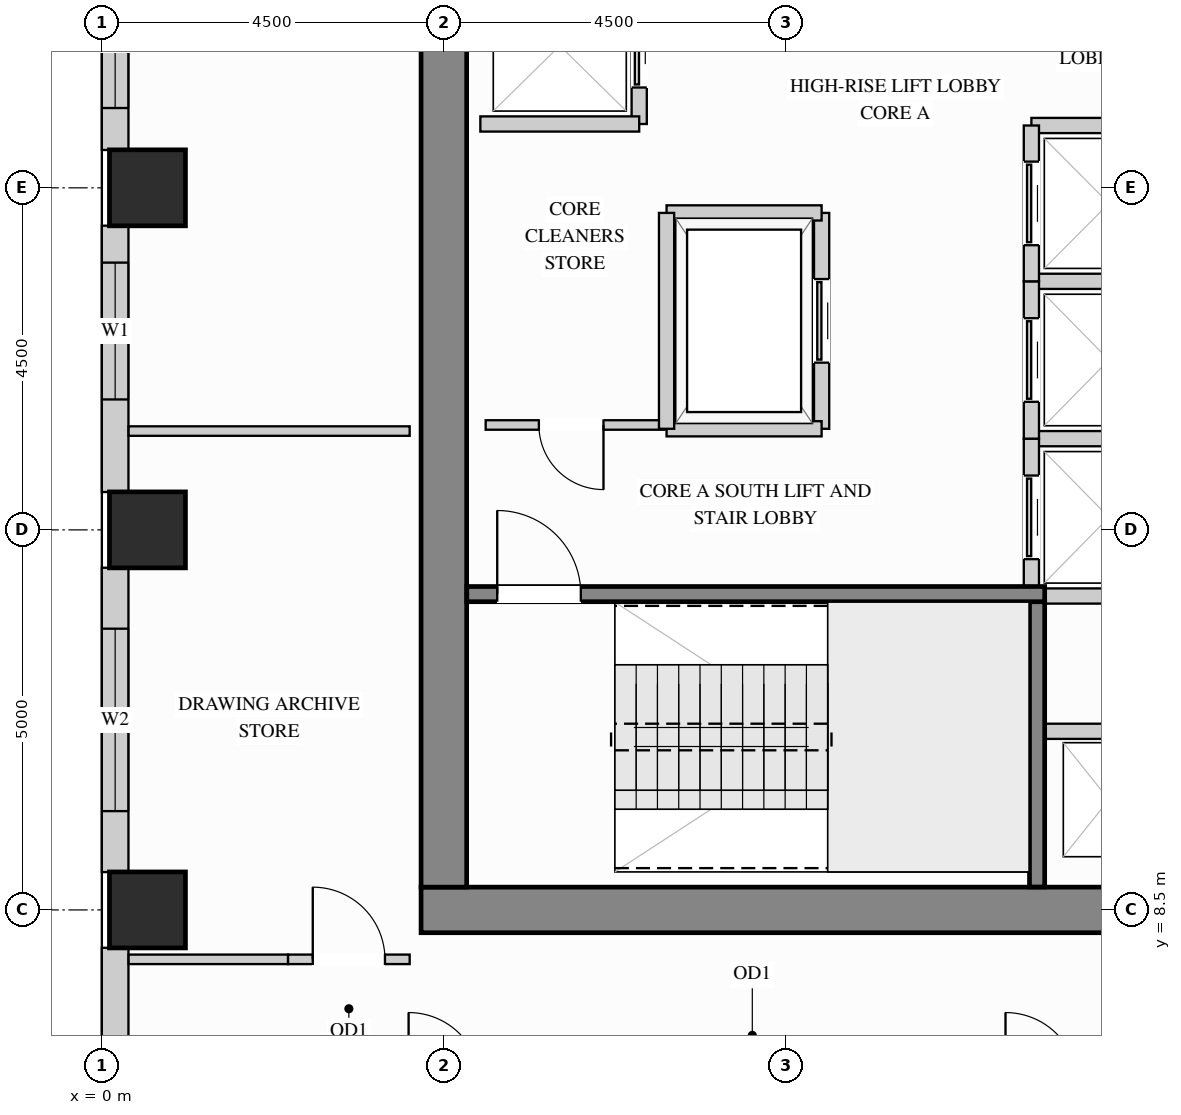
"""IFC4 building model, lengths in metres.
Left out: names, types, materials, properties, quantities, classifications, styles, units other than length and angle.
Written with IfcOpenShell. Run it as: python <this file> out.ifc"""

import sys

from ifc_helpers import new_model, si_unit, direction, frame, frame_2d, origin, origin_2d, place, context, subcontext, project, spatial, rectangle, extrude, source, transform, mapped, element, fill, save


model = new_model("IFC4")
c1 = context("Model", 3, precision=1e-05, world=origin(), true_north=direction((0.0, 1.0)))
c2 = subcontext(c1, "Body", "Model", "MODEL_VIEW")
j1 = project(units=[si_unit("LENGTHUNIT", "METRE"), si_unit("PLANEANGLEUNIT", "RADIAN")], contexts=[c1])
p1 = place(None, origin())
s1 = spatial("IfcSite", under=j1, at=p1, CompositionType="ELEMENT")
p2 = place(p1, origin())
s2 = spatial("IfcBuilding", under=s1, at=p2, CompositionType="ELEMENT")
p3 = place(p2, frame((0.0, 0.0, 200.7)))
s3 = spatial("IfcBuildingStorey", under=s2, at=p3, CompositionType="ELEMENT", Elevation=200.7)
m1 = source(origin(), c2, "Body", "SweptSolid", [
    extrude(rectangle(XDim=1.0, YDim=1.0, at=origin_2d()), origin(), (0.0, 0.0, 1.0), 3.4),
])
for number, where, z_axis, x_axis in (
    (1, (0.6, 13.5, 0.0), (0.0, 0.0, 1.0), (1.0, 0.0, 0.0)),
    (2, (0.6, 18.0, 0.0), (0.0, 0.0, 1.0), (1.0, 0.0, 0.0)),
    (3, (0.6, 8.5, 0.0), (0.0, 0.0, 1.0), (1.0, 0.0, 0.0)),
):
    element("IfcColumn", number, at=place(p3, frame(where, z_axis=z_axis, x_axis=x_axis)), inside=s3, PredefinedType="COLUMN", context=c2, shape_type="MappedRepresentation", body=[
        mapped(m1, transform((0.0, 0.0, 0.0), x_axis=(1.0, 0.0, 0.0), y_axis=(0.0, 1.0, 0.0), z_axis=(0.0, 0.0, 1.0))),
    ])
m2 = source(origin(), c2, "Body", "SweptSolid", [
    extrude(rectangle(XDim=10.6, YDim=0.6, at=frame_2d((5.3, 0.0))), origin(), (0.0, 0.0, 1.0), 3.4),
])
p4 = place(p3, frame((4.2, 8.5, 0.0), z_axis=(0.0, 0.0, 1.0), x_axis=(1.0, 0.0, 0.0)))
e4 = element("IfcWall", 4, at=p4, inside=s3, PredefinedType="SHEAR", context=c2, shape_type="MappedRepresentation", body=[
    mapped(m2, transform((0.0, 0.0, 0.0), x_axis=(1.0, 0.0, 0.0), y_axis=(0.0, 1.0, 0.0), z_axis=(0.0, 0.0, 1.0))),
])
m3 = source(origin(), c2, "Body", "SweptSolid", [
    extrude(rectangle(XDim=20.4, YDim=0.6, at=frame_2d((10.2, 0.0))), origin(), (0.0, 0.0, 1.0), 3.4),
])
p5 = place(p3, frame((4.5, 8.8, 0.0), z_axis=(0.0, 0.0, 1.0), x_axis=(0.0, 1.0, 0.0)))
e5 = element("IfcWall", 5, at=p5, inside=s3, PredefinedType="SHEAR", context=c2, shape_type="MappedRepresentation", body=[
    mapped(m3, transform((0.0, 0.0, 0.0), x_axis=(1.0, 0.0, 0.0), y_axis=(0.0, 1.0, 0.0), z_axis=(0.0, 0.0, 1.0))),
])
p6 = place(p3, frame((0.175, 22.002, 0.0), z_axis=(0.0, 0.0, 1.0), x_axis=(0.0, -1.0, 0.0)))
e6 = element("IfcWall", 6, at=p6, inside=s3, PredefinedType="SOLIDWALL", context=c2, shape_type="SweptSolid", body=[
    extrude(rectangle(XDim=3.504, YDim=0.35, at=frame_2d((1.752, 0.0))), origin(), (0.0, 0.0, 1.0), 2.612),
])
p7 = place(p6, frame((0.552, 0.0, 0.78)))
e7 = element("IfcOpeningElement", 7, at=p7, cuts=e6, PredefinedType="OPENING", context=c2, shape_type="SweptSolid", body=[
    extrude(rectangle(XDim=2.4, YDim=1.652, at=frame_2d((1.2, 0.826))), frame((0.0, 0.185, 0.0), z_axis=(0.0, -1.0, 0.0), x_axis=(1.0, 0.0, 0.0)), (0.0, 0.0, 1.0), 0.37),
])
p8 = place(p3, frame((0.175, 17.502, 0.0), z_axis=(0.0, 0.0, 1.0), x_axis=(0.0, -1.0, 0.0)))
e8 = element("IfcWall", 8, at=p8, inside=s3, PredefinedType="SOLIDWALL", context=c2, shape_type="SweptSolid", body=[
    extrude(rectangle(XDim=3.504, YDim=0.35, at=frame_2d((1.752, 0.0))), origin(), (0.0, 0.0, 1.0), 2.612),
])
p9 = place(p8, frame((0.486, 0.0, 0.78)))
e9 = element("IfcOpeningElement", 9, at=p9, cuts=e8, PredefinedType="OPENING", context=c2, shape_type="SweptSolid", body=[
    extrude(rectangle(XDim=1.8, YDim=1.652, at=frame_2d((0.9, 0.826))), frame((0.0, 0.185, 0.0), z_axis=(0.0, -1.0, 0.0), x_axis=(1.0, 0.0, 0.0)), (0.0, 0.0, 1.0), 0.37),
])
p10 = place(p3, frame((0.175, 13.002, 0.0), z_axis=(0.0, 0.0, 1.0), x_axis=(0.0, -1.0, 0.0)))
e10 = element("IfcWall", 10, at=p10, inside=s3, PredefinedType="SOLIDWALL", context=c2, shape_type="SweptSolid", body=[
    extrude(rectangle(XDim=4.004, YDim=0.35, at=frame_2d((2.002, 0.0))), origin(), (0.0, 0.0, 1.0), 2.612),
])
p11 = place(p10, frame((0.802, 0.0, 0.78)))
e11 = element("IfcOpeningElement", 11, at=p11, cuts=e10, PredefinedType="OPENING", context=c2, shape_type="SweptSolid", body=[
    extrude(rectangle(XDim=2.4, YDim=1.652, at=frame_2d((1.2, 0.826))), frame((0.0, 0.185, 0.0), z_axis=(0.0, -1.0, 0.0), x_axis=(1.0, 0.0, 0.0)), (0.0, 0.0, 1.0), 0.37),
])
p12 = place(p3, frame((0.175, 8.002, 0.0), z_axis=(0.0, 0.0, 1.0), x_axis=(0.0, -1.0, 0.0)))
e12 = element("IfcWall", 12, at=p12, inside=s3, PredefinedType="SOLIDWALL", context=c2, shape_type="SweptSolid", body=[
    extrude(rectangle(XDim=4.004, YDim=0.35, at=frame_2d((2.002, 0.0))), origin(), (0.0, 0.0, 1.0), 2.612),
])
p13 = place(p12, frame((2.268, 0.0, 0.78)))
e13 = element("IfcOpeningElement", 13, at=p13, cuts=e12, PredefinedType="OPENING", context=c2, shape_type="SweptSolid", body=[
    extrude(rectangle(XDim=1.2, YDim=1.652, at=frame_2d((0.6, 0.826))), frame((0.0, 0.185, 0.0), z_axis=(0.0, -1.0, 0.0), x_axis=(1.0, 0.0, 0.0)), (0.0, 0.0, 1.0), 0.37),
])
p14 = place(p3, frame((5.05, 14.88, 0.0), z_axis=(0.0, 0.0, 1.0), x_axis=(1.0, 0.0, 0.0)))
e14 = element("IfcWall", 14, at=p14, inside=s3, PredefinedType="PARTITIONING", context=c2, shape_type="SweptSolid", body=[
    extrude(rectangle(XDim=2.35, YDim=0.125, at=frame_2d((1.175, 0.0))), origin(), (0.0, 0.0, 1.0), 3.385),
])
p15 = place(p14, frame((0.7, 0.0, 0.0)))
e15 = element("IfcOpeningElement", 15, at=p15, cuts=e14, PredefinedType="OPENING", context=c2, shape_type="SweptSolid", body=[
    extrude(rectangle(XDim=0.85, YDim=2.1, at=frame_2d((0.425, 1.05))), frame((0.0, 0.073, 0.0), z_axis=(0.0, -1.0, 0.0), x_axis=(1.0, 0.0, 0.0)), (0.0, 0.0, 1.0), 0.145),
])
m4 = source(origin(), c2, "Body", "SweptSolid", [
    extrude(rectangle(XDim=2.098, YDim=0.125, at=frame_2d((1.049, 0.0))), origin(), (0.0, 0.0, 1.0), 3.385),
])
p16 = place(p3, frame((0.352, 7.85, 0.0), z_axis=(0.0, 0.0, 1.0), x_axis=(1.0, 0.0, 0.0)))
e16 = element("IfcWall", 16, at=p16, inside=s3, PredefinedType="PARTITIONING", context=c2, shape_type="MappedRepresentation", body=[
    mapped(m4, transform((0.0, 0.0, 0.0), x_axis=(1.0, 0.0, 0.0), y_axis=(0.0, 1.0, 0.0), z_axis=(0.0, 0.0, 1.0))),
])
p17 = place(p3, frame((2.45, 7.85, 0.0), z_axis=(0.0, 0.0, 1.0), x_axis=(1.0, 0.0, 0.0)))
e17 = element("IfcWall", 17, at=p17, inside=s3, PredefinedType="PARTITIONING", context=c2, shape_type="SweptSolid", body=[
    extrude(rectangle(XDim=1.6, YDim=0.125, at=frame_2d((0.8, 0.0))), origin(), (0.0, 0.0, 1.0), 3.385),
])
p18 = place(p17, frame((0.325, 0.0, 0.0)))
e18 = element("IfcOpeningElement", 18, at=p18, cuts=e17, PredefinedType="OPENING", context=c2, shape_type="SweptSolid", body=[
    extrude(rectangle(XDim=0.95, YDim=2.15, at=frame_2d((0.475, 1.075))), frame((0.0, 0.073, 0.0), z_axis=(0.0, -1.0, 0.0), x_axis=(1.0, 0.0, 0.0)), (0.0, 0.0, 1.0), 0.145),
])
m5 = source(origin(), c2, "Body", "SweptSolid", [
    extrude(rectangle(XDim=3.698, YDim=0.125, at=frame_2d((1.849, 0.0))), origin(), (0.0, 0.0, 1.0), 3.385),
])
p19 = place(p3, frame((0.352, 14.8, 0.0), z_axis=(0.0, 0.0, 1.0), x_axis=(1.0, 0.0, 0.0)))
e19 = element("IfcWall", 19, at=p19, inside=s3, PredefinedType="PARTITIONING", context=c2, shape_type="MappedRepresentation", body=[
    mapped(m5, transform((0.0, 0.0, 0.0), x_axis=(1.0, 0.0, 0.0), y_axis=(0.0, 1.0, 0.0), z_axis=(0.0, 0.0, 1.0))),
])
m6 = source(origin(), c2, "Body", "SweptSolid", [
    extrude(rectangle(XDim=1.63, YDim=0.2, at=frame_2d((0.815, 0.0))), origin(), (0.0, 0.0, 1.0), 3.385),
])
p20 = place(p3, frame((12.42, 10.85, 0.0), z_axis=(0.0, 0.0, 1.0), x_axis=(1.0, 0.0, 0.0)))
e20 = element("IfcWall", 20, at=p20, inside=s3, PredefinedType="PARTITIONING", context=c2, shape_type="MappedRepresentation", body=[
    mapped(m6, transform((0.0, 0.0, 0.0), x_axis=(1.0, 0.0, 0.0), y_axis=(0.0, 1.0, 0.0), z_axis=(0.0, 0.0, 1.0))),
])
m7 = source(origin(), c2, "Body", "SweptSolid", [
    extrude(rectangle(XDim=1.94, YDim=0.2, at=frame_2d((0.97, 0.0))), origin(), (0.0, 0.0, 1.0), 3.385),
])
for number, where, z_axis, x_axis in (
    (21, (12.23, 14.7, 0.0), (0.0, 0.0, 1.0), (1.0, 0.0, 0.0)),
    (22, (12.23, 12.63, 0.0), (0.0, 0.0, 1.0), (1.0, 0.0, 0.0)),
):
    element("IfcWall", number, at=place(p3, frame(where, z_axis=z_axis, x_axis=x_axis)), inside=s3, PredefinedType="PARTITIONING", context=c2, shape_type="MappedRepresentation", body=[
        mapped(m7, transform((0.0, 0.0, 0.0), x_axis=(1.0, 0.0, 0.0), y_axis=(0.0, 1.0, 0.0), z_axis=(0.0, 0.0, 1.0))),
    ])
p21 = place(p3, frame((12.23, 12.63, 0.0), z_axis=(0.0, 0.0, 1.0), x_axis=(0.0, 1.0, 0.0)))
e23 = element("IfcWall", 23, at=p21, inside=s3, PredefinedType="PARTITIONING", context=c2, shape_type="SweptSolid", body=[
    extrude(rectangle(XDim=2.07, YDim=0.2, at=frame_2d((1.035, 0.0))), origin(), (0.0, 0.0, 1.0), 3.385),
])
p22 = place(p21, frame((0.485, 0.0, 0.0)))
e24 = element("IfcOpeningElement", 24, at=p22, cuts=e23, PredefinedType="OPENING", context=c2, shape_type="SweptSolid", body=[
    extrude(rectangle(XDim=1.1, YDim=2.2, at=frame_2d((0.55, 1.1))), frame((0.0, 0.11, 0.0), z_axis=(0.0, -1.0, 0.0), x_axis=(1.0, 0.0, 0.0)), (0.0, 0.0, 1.0), 0.22),
])
p23 = place(p3, frame((12.23, 16.77, 0.0), z_axis=(0.0, 0.0, 1.0), x_axis=(1.0, 0.0, 0.0)))
e25 = element("IfcWall", 25, at=p23, inside=s3, PredefinedType="PARTITIONING", context=c2, shape_type="MappedRepresentation", body=[
    mapped(m7, transform((0.0, 0.0, 0.0), x_axis=(1.0, 0.0, 0.0), y_axis=(0.0, 1.0, 0.0), z_axis=(0.0, 0.0, 1.0))),
])
p24 = place(p3, frame((12.23, 14.7, 0.0), z_axis=(0.0, 0.0, 1.0), x_axis=(0.0, 1.0, 0.0)))
e26 = element("IfcWall", 26, at=p24, inside=s3, PredefinedType="PARTITIONING", context=c2, shape_type="SweptSolid", body=[
    extrude(rectangle(XDim=2.07, YDim=0.2, at=frame_2d((1.035, 0.0))), origin(), (0.0, 0.0, 1.0), 3.385),
])
p25 = place(p24, frame((0.485, 0.0, 0.0)))
e27 = element("IfcOpeningElement", 27, at=p25, cuts=e26, PredefinedType="OPENING", context=c2, shape_type="SweptSolid", body=[
    extrude(rectangle(XDim=1.1, YDim=2.2, at=frame_2d((0.55, 1.1))), frame((0.0, 0.11, 0.0), z_axis=(0.0, -1.0, 0.0), x_axis=(1.0, 0.0, 0.0)), (0.0, 0.0, 1.0), 0.22),
])
p26 = place(p3, frame((12.23, 18.82, 0.0), z_axis=(0.0, 0.0, 1.0), x_axis=(1.0, 0.0, 0.0)))
e28 = element("IfcWall", 28, at=p26, inside=s3, PredefinedType="PARTITIONING", context=c2, shape_type="MappedRepresentation", body=[
    mapped(m7, transform((0.0, 0.0, 0.0), x_axis=(1.0, 0.0, 0.0), y_axis=(0.0, 1.0, 0.0), z_axis=(0.0, 0.0, 1.0))),
])
p27 = place(p3, frame((12.23, 16.77, 0.0), z_axis=(0.0, 0.0, 1.0), x_axis=(0.0, 1.0, 0.0)))
e29 = element("IfcWall", 29, at=p27, inside=s3, PredefinedType="PARTITIONING", context=c2, shape_type="SweptSolid", body=[
    extrude(rectangle(XDim=2.05, YDim=0.2, at=frame_2d((1.025, 0.0))), origin(), (0.0, 0.0, 1.0), 3.385),
])
p28 = place(p27, frame((0.475, 0.0, 0.0)))
e30 = element("IfcOpeningElement", 30, at=p28, cuts=e29, PredefinedType="OPENING", context=c2, shape_type="SweptSolid", body=[
    extrude(rectangle(XDim=1.1, YDim=2.2, at=frame_2d((0.55, 1.1))), frame((0.0, 0.11, 0.0), z_axis=(0.0, -1.0, 0.0), x_axis=(1.0, 0.0, 0.0)), (0.0, 0.0, 1.0), 0.22),
])
p29 = place(p3, frame((7.07, 18.84, 0.0), z_axis=(0.0, 0.0, 1.0), x_axis=(0.0, 1.0, 0.0)))
e31 = element("IfcWall", 31, at=p29, inside=s3, PredefinedType="PARTITIONING", context=c2, shape_type="SweptSolid", body=[
    extrude(rectangle(XDim=2.06, YDim=0.2, at=frame_2d((1.03, 0.0))), origin(), (0.0, 0.0, 1.0), 3.385),
])
p30 = place(p29, frame((0.48, 0.0, 0.0)))
e32 = element("IfcOpeningElement", 32, at=p30, cuts=e31, PredefinedType="OPENING", context=c2, shape_type="SweptSolid", body=[
    extrude(rectangle(XDim=1.1, YDim=2.2, at=frame_2d((0.55, 1.1))), frame((0.0, 0.11, 0.0), z_axis=(0.0, -1.0, 0.0), x_axis=(1.0, 0.0, 0.0)), (0.0, 0.0, 1.0), 0.22),
])
m8 = source(origin(), c2, "Body", "SweptSolid", [
    extrude(rectangle(XDim=2.09, YDim=0.2, at=frame_2d((1.045, 0.0))), origin(), (0.0, 0.0, 1.0), 3.385),
])
p31 = place(p3, frame((4.98, 18.84, 0.0), z_axis=(0.0, 0.0, 1.0), x_axis=(1.0, 0.0, 0.0)))
e33 = element("IfcWall", 33, at=p31, inside=s3, PredefinedType="PARTITIONING", context=c2, shape_type="MappedRepresentation", body=[
    mapped(m8, transform((0.0, 0.0, 0.0), x_axis=(1.0, 0.0, 0.0), y_axis=(0.0, 1.0, 0.0), z_axis=(0.0, 0.0, 1.0))),
])
p32 = place(p3, frame((9.47, 14.83, 0.0), z_axis=(0.0, 0.0, 1.0), x_axis=(0.0, 1.0, 0.0)))
e34 = element("IfcWall", 34, at=p32, inside=s3, PredefinedType="PARTITIONING", context=c2, shape_type="SweptSolid", body=[
    extrude(rectangle(XDim=2.84, YDim=0.2, at=frame_2d((1.42, 0.0))), origin(), (0.0, 0.0, 1.0), 3.385),
])
p33 = place(p32, frame((0.87, 0.0, 0.0)))
e35 = element("IfcOpeningElement", 35, at=p33, cuts=e34, PredefinedType="OPENING", context=c2, shape_type="SweptSolid", body=[
    extrude(rectangle(XDim=1.1, YDim=2.2, at=frame_2d((0.55, 1.1))), frame((0.0, 0.11, 0.0), z_axis=(0.0, -1.0, 0.0), x_axis=(1.0, 0.0, 0.0)), (0.0, 0.0, 1.0), 0.22),
])
m9 = source(origin(), c2, "Body", "SweptSolid", [
    extrude(rectangle(XDim=2.04, YDim=0.2, at=frame_2d((1.02, 0.0))), origin(), (0.0, 0.0, 1.0), 3.385),
])
for number, where, z_axis, x_axis in (
    (36, (7.43, 17.67, 0.0), (0.0, 0.0, 1.0), (1.0, 0.0, 0.0)),
    (37, (7.43, 14.83, 0.0), (0.0, 0.0, 1.0), (1.0, 0.0, 0.0)),
):
    element("IfcWall", number, at=place(p3, frame(where, z_axis=z_axis, x_axis=x_axis)), inside=s3, PredefinedType="PARTITIONING", context=c2, shape_type="MappedRepresentation", body=[
        mapped(m9, transform((0.0, 0.0, 0.0), x_axis=(1.0, 0.0, 0.0), y_axis=(0.0, 1.0, 0.0), z_axis=(0.0, 0.0, 1.0))),
    ])
m10 = source(origin(), c2, "Body", "SweptSolid", [
    extrude(rectangle(XDim=2.84, YDim=0.2, at=frame_2d((1.42, 0.0))), origin(), (0.0, 0.0, 1.0), 3.385),
])
p34 = place(p3, frame((7.43, 14.83, 0.0), z_axis=(0.0, 0.0, 1.0), x_axis=(0.0, 1.0, 0.0)))
e38 = element("IfcWall", 38, at=p34, inside=s3, PredefinedType="PARTITIONING", context=c2, shape_type="MappedRepresentation", body=[
    mapped(m10, transform((0.0, 0.0, 0.0), x_axis=(1.0, 0.0, 0.0), y_axis=(0.0, 1.0, 0.0), z_axis=(0.0, 0.0, 1.0))),
])
m11 = source(origin(), c2, "Body", "SweptSolid", [
    extrude(rectangle(XDim=3.753, YDim=0.2, at=frame_2d((1.876, 0.0))), origin(), (0.0, 0.0, 1.0), 3.4),
])
p35 = place(p3, frame((12.305, 8.802, 0.0), z_axis=(0.0, 0.0, 1.0), x_axis=(0.0, 1.0, 0.0)))
e39 = element("IfcWall", 39, at=p35, inside=s3, PredefinedType="SHEAR", context=c2, shape_type="MappedRepresentation", body=[
    mapped(m11, transform((0.0, 0.0, 0.0), x_axis=(1.0, 0.0, 0.0), y_axis=(0.0, 1.0, 0.0), z_axis=(0.0, 0.0, 1.0))),
])
p36 = place(p3, frame((4.802, 12.655, 0.0), z_axis=(0.0, 0.0, 1.0), x_axis=(1.0, 0.0, 0.0)))
e40 = element("IfcWall", 40, at=p36, inside=s3, PredefinedType="SHEAR", context=c2, shape_type="SweptSolid", body=[
    extrude(rectangle(XDim=7.603, YDim=0.2, at=frame_2d((3.802, 0.0))), origin(), (0.0, 0.0, 1.0), 3.4),
])
p37 = place(p36, frame((0.4, 0.0, 0.0)))
e41 = element("IfcOpeningElement", 41, at=p37, cuts=e40, PredefinedType="OPENING", context=c2, shape_type="SweptSolid", body=[
    extrude(rectangle(XDim=1.1, YDim=2.15, at=frame_2d((0.55, 1.075))), frame((0.0, 0.11, 0.0), z_axis=(0.0, -1.0, 0.0), x_axis=(1.0, 0.0, 0.0)), (0.0, 0.0, 1.0), 0.22),
])
m12 = source(origin(), c2, "Body", "SweptSolid", [
    extrude(rectangle(XDim=1.1, YDim=2.2, at=frame_2d((0.55, 1.1))), frame((0.0, 0.025, 0.0), z_axis=(0.0, -1.0, 0.0), x_axis=(1.0, 0.0, 0.0)), (0.0, 0.0, 1.0), 0.05),
])
p38 = place(p22, origin())
e42 = element("IfcDoor", 42, at=p38, inside=s3, OperationType="SLIDING_TO_LEFT", PredefinedType="DOOR", context=c2, shape_type="MappedRepresentation", body=[
    mapped(m12, transform((0.0, 0.0, 0.0), x_axis=(1.0, 0.0, 0.0), y_axis=(0.0, 1.0, 0.0), z_axis=(0.0, 0.0, 1.0))),
])
fill(e24, e42)
p39 = place(p25, origin())
e43 = element("IfcDoor", 43, at=p39, inside=s3, OperationType="SLIDING_TO_LEFT", PredefinedType="DOOR", context=c2, shape_type="MappedRepresentation", body=[
    mapped(m12, transform((0.0, 0.0, 0.0), x_axis=(1.0, 0.0, 0.0), y_axis=(0.0, 1.0, 0.0), z_axis=(0.0, 0.0, 1.0))),
])
fill(e27, e43)
p40 = place(p28, origin())
e44 = element("IfcDoor", 44, at=p40, inside=s3, OperationType="SLIDING_TO_LEFT", PredefinedType="DOOR", context=c2, shape_type="MappedRepresentation", body=[
    mapped(m12, transform((0.0, 0.0, 0.0), x_axis=(1.0, 0.0, 0.0), y_axis=(0.0, 1.0, 0.0), z_axis=(0.0, 0.0, 1.0))),
])
fill(e30, e44)
p41 = place(p30, origin())
e45 = element("IfcDoor", 45, at=p41, inside=s3, OperationType="SLIDING_TO_LEFT", PredefinedType="DOOR", context=c2, shape_type="MappedRepresentation", body=[
    mapped(m12, transform((0.0, 0.0, 0.0), x_axis=(1.0, 0.0, 0.0), y_axis=(0.0, 1.0, 0.0), z_axis=(0.0, 0.0, 1.0))),
])
fill(e32, e45)
p42 = place(p33, origin())
e46 = element("IfcDoor", 46, at=p42, inside=s3, OperationType="SLIDING_TO_LEFT", PredefinedType="DOOR", context=c2, shape_type="MappedRepresentation", body=[
    mapped(m12, transform((0.0, 0.0, 0.0), x_axis=(1.0, 0.0, 0.0), y_axis=(0.0, 1.0, 0.0), z_axis=(0.0, 0.0, 1.0))),
])
fill(e35, e46)
m13 = source(origin(), c2, "Body", "SweptSolid", [
    extrude(rectangle(XDim=0.95, YDim=2.15, at=frame_2d((0.475, 1.075))), frame((0.0, 0.025, 0.0), z_axis=(0.0, -1.0, 0.0), x_axis=(1.0, 0.0, 0.0)), (0.0, 0.0, 1.0), 0.05),
])
p43 = place(p18, origin())
e47 = element("IfcDoor", 47, at=p43, inside=s3, OperationType="SINGLE_SWING_LEFT", PredefinedType="DOOR", context=c2, shape_type="MappedRepresentation", body=[
    mapped(m13, transform((0.0, 0.0, 0.0), x_axis=(1.0, 0.0, 0.0), y_axis=(0.0, 1.0, 0.0), z_axis=(0.0, 0.0, 1.0))),
])
fill(e18, e47)
m14 = source(origin(), c2, "Body", "SweptSolid", [
    extrude(rectangle(XDim=0.85, YDim=2.1, at=frame_2d((0.425, 1.05))), frame((0.0, 0.025, 0.0), z_axis=(0.0, -1.0, 0.0), x_axis=(1.0, 0.0, 0.0)), (0.0, 0.0, 1.0), 0.05),
])
p44 = place(p15, origin())
e48 = element("IfcDoor", 48, at=p44, inside=s3, OperationType="SINGLE_SWING_RIGHT", PredefinedType="DOOR", context=c2, shape_type="MappedRepresentation", body=[
    mapped(m14, transform((0.0, 0.0, 0.0), x_axis=(1.0, 0.0, 0.0), y_axis=(0.0, 1.0, 0.0), z_axis=(0.0, 0.0, 1.0))),
])
fill(e15, e48)
m15 = source(origin(), c2, "Body", "SweptSolid", [
    extrude(rectangle(XDim=1.1, YDim=2.15, at=frame_2d((0.55, 1.075))), frame((0.0, 0.025, 0.0), z_axis=(0.0, -1.0, 0.0), x_axis=(1.0, 0.0, 0.0)), (0.0, 0.0, 1.0), 0.05),
])
p45 = place(p37, origin())
e49 = element("IfcDoor", 49, at=p45, inside=s3, OperationType="SINGLE_SWING_LEFT", PredefinedType="DOOR", context=c2, shape_type="MappedRepresentation", body=[
    mapped(m15, transform((0.0, 0.0, 0.0), x_axis=(1.0, 0.0, 0.0), y_axis=(0.0, 1.0, 0.0), z_axis=(0.0, 0.0, 1.0))),
])
fill(e41, e49)
m16 = source(origin(), c2, "Body", "SweptSolid", [
    extrude(rectangle(XDim=1.8, YDim=1.652, at=frame_2d((0.9, 0.826))), frame((0.0, 0.03, 0.0), z_axis=(0.0, -1.0, 0.0), x_axis=(1.0, 0.0, 0.0)), (0.0, 0.0, 1.0), 0.06),
])
p46 = place(p9, origin())
e50 = element("IfcWindow", 50, at=p46, inside=s3, PartitioningType="SINGLE_PANEL", PredefinedType="WINDOW", context=c2, shape_type="MappedRepresentation", body=[
    mapped(m16, transform((0.0, 0.0, 0.0), x_axis=(1.0, 0.0, 0.0), y_axis=(0.0, 1.0, 0.0), z_axis=(0.0, 0.0, 1.0))),
])
fill(e9, e50)
m17 = source(origin(), c2, "Body", "SweptSolid", [
    extrude(rectangle(XDim=2.4, YDim=1.652, at=frame_2d((1.2, 0.826))), frame((0.0, 0.03, 0.0), z_axis=(0.0, -1.0, 0.0), x_axis=(1.0, 0.0, 0.0)), (0.0, 0.0, 1.0), 0.06),
])
p47 = place(p7, origin())
e51 = element("IfcWindow", 51, at=p47, inside=s3, PartitioningType="SINGLE_PANEL", PredefinedType="WINDOW", context=c2, shape_type="MappedRepresentation", body=[
    mapped(m17, transform((0.0, 0.0, 0.0), x_axis=(1.0, 0.0, 0.0), y_axis=(0.0, 1.0, 0.0), z_axis=(0.0, 0.0, 1.0))),
])
fill(e7, e51)
p48 = place(p11, origin())
e52 = element("IfcWindow", 52, at=p48, inside=s3, PartitioningType="SINGLE_PANEL", PredefinedType="WINDOW", context=c2, shape_type="MappedRepresentation", body=[
    mapped(m17, transform((0.0, 0.0, 0.0), x_axis=(1.0, 0.0, 0.0), y_axis=(0.0, 1.0, 0.0), z_axis=(0.0, 0.0, 1.0))),
])
fill(e11, e52)
save(model, sys.argv[1])
